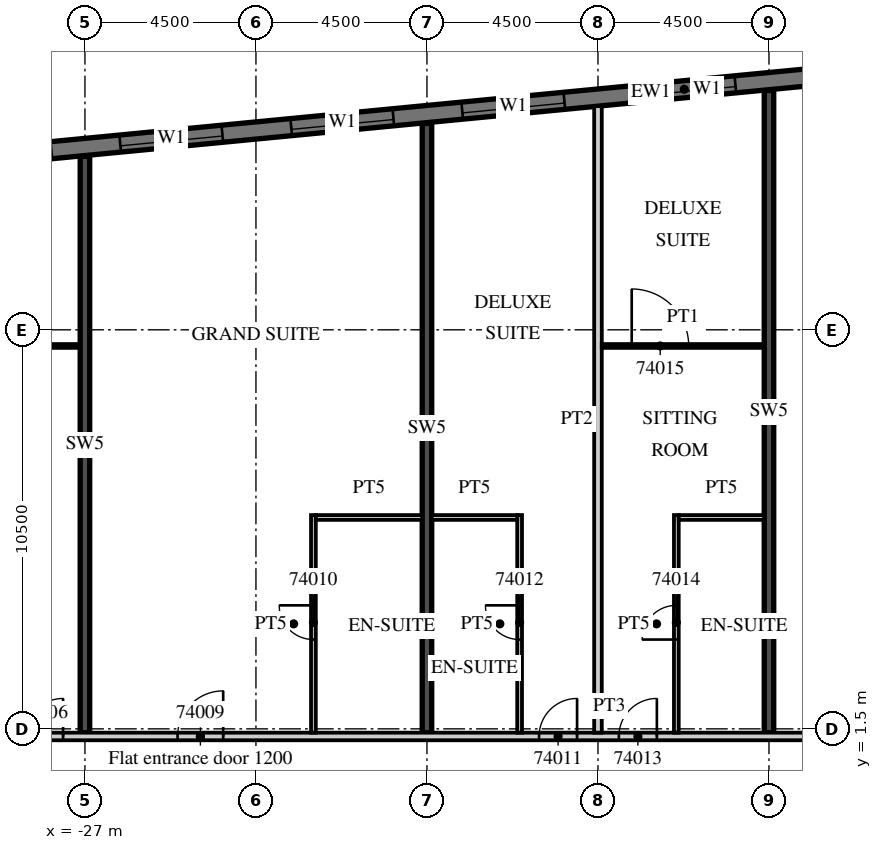
"""IFC4 building model, lengths in metres.
Left out: names, types, materials, properties, quantities, classifications, styles, units other than length and angle.
Written with IfcOpenShell. Run it as: python <this file> out.ifc"""

import sys

from ifc_helpers import new_model, si_unit, direction, frame, frame_2d, origin, place, context, subcontext, project, spatial, rectangle, extrude, element, fill, save


model = new_model("IFC4")
c1 = context("Model", 3, precision=1e-05, world=origin(), true_north=direction((0.0, 1.0)))
c2 = subcontext(c1, "Body", "Model", "MODEL_VIEW")
j1 = project(units=[si_unit("LENGTHUNIT", "METRE"), si_unit("PLANEANGLEUNIT", "RADIAN")], contexts=[c1])
p1 = place(None, origin())
s1 = spatial("IfcSite", under=j1, at=p1, CompositionType="ELEMENT")
p2 = place(p1, origin())
s2 = spatial("IfcBuilding", under=s1, at=p2, CompositionType="ELEMENT")
p3 = place(p2, frame((0.0, 0.0, 294.9)))
s3 = spatial("IfcBuildingStorey", under=s2, at=p3, CompositionType="ELEMENT", Elevation=294.9)
p4 = place(p3, frame((-27.0, 1.4, 0.0), z_axis=(0.0, 0.0, 1.0), x_axis=(0.0, 1.0, 0.0)))
e1 = element("IfcWall", 1, at=p4, inside=s3, PredefinedType="SHEAR", context=c2, shape_type="SweptSolid", body=[
    extrude(rectangle(XDim=15.163, YDim=0.25, at=frame_2d((7.582, 0.0))), origin(), (0.0, 0.0, 1.0), 3.3),
])
p5 = place(p3, frame((-18.0, 1.4, 0.0), z_axis=(0.0, 0.0, 1.0), x_axis=(0.0, 1.0, 0.0)))
e2 = element("IfcWall", 2, at=p5, inside=s3, PredefinedType="SHEAR", context=c2, shape_type="SweptSolid", body=[
    extrude(rectangle(XDim=16.03, YDim=0.25, at=frame_2d((8.015, 0.0))), origin(), (0.0, 0.0, 1.0), 3.3),
])
p6 = place(p3, frame((-9.0, 1.4, 0.0), z_axis=(0.0, 0.0, 1.0), x_axis=(0.0, 1.0, 0.0)))
e3 = element("IfcWall", 3, at=p6, inside=s3, PredefinedType="SHEAR", context=c2, shape_type="SweptSolid", body=[
    extrude(rectangle(XDim=16.896, YDim=0.25, at=frame_2d((8.448, 0.0))), origin(), (0.0, 0.0, 1.0), 3.3),
])
p7 = place(p3, frame((13.521, 20.713, 0.0), z_axis=(0.0, 0.0, 1.0), x_axis=(-0.995396277313, -0.095844932638, 0.0)))
e4 = element("IfcWall", 4, at=p7, inside=s3, PredefinedType="SOLIDWALL", context=c2, shape_type="SweptSolid", body=[
    extrude(rectangle(XDim=51.495, YDim=0.45, at=frame_2d((25.748, 0.0))), origin(), (0.0, 0.0, 1.0), 3.02),
])
p8 = place(p7, frame((0.91, 0.0, 0.45)))
e5 = element("IfcOpeningElement", 5, at=p8, cuts=e4, PredefinedType="OPENING", context=c2, shape_type="SweptSolid", body=[
    extrude(rectangle(XDim=2.7, YDim=2.25, at=frame_2d((1.35, 1.125))), frame((0.0, 0.235, 0.0), z_axis=(0.0, -1.0, 0.0), x_axis=(1.0, 0.0, 0.0)), (0.0, 0.0, 1.0), 0.47),
])
p9 = place(p7, frame((5.431, 0.0, 0.45)))
e6 = element("IfcOpeningElement", 6, at=p9, cuts=e4, PredefinedType="OPENING", context=c2, shape_type="SweptSolid", body=[
    extrude(rectangle(XDim=2.7, YDim=2.25, at=frame_2d((1.35, 1.125))), frame((0.0, 0.235, 0.0), z_axis=(0.0, -1.0, 0.0), x_axis=(1.0, 0.0, 0.0)), (0.0, 0.0, 1.0), 0.47),
])
p10 = place(p7, frame((9.952, 0.0, 0.45)))
e7 = element("IfcOpeningElement", 7, at=p10, cuts=e4, PredefinedType="OPENING", context=c2, shape_type="SweptSolid", body=[
    extrude(rectangle(XDim=2.7, YDim=2.25, at=frame_2d((1.35, 1.125))), frame((0.0, 0.235, 0.0), z_axis=(0.0, -1.0, 0.0), x_axis=(1.0, 0.0, 0.0)), (0.0, 0.0, 1.0), 0.47),
])
p11 = place(p7, frame((14.473, 0.0, 0.45)))
e8 = element("IfcOpeningElement", 8, at=p11, cuts=e4, PredefinedType="OPENING", context=c2, shape_type="SweptSolid", body=[
    extrude(rectangle(XDim=2.7, YDim=2.25, at=frame_2d((1.35, 1.125))), frame((0.0, 0.235, 0.0), z_axis=(0.0, -1.0, 0.0), x_axis=(1.0, 0.0, 0.0)), (0.0, 0.0, 1.0), 0.47),
])
p12 = place(p7, frame((18.994, 0.0, 0.45)))
e9 = element("IfcOpeningElement", 9, at=p12, cuts=e4, PredefinedType="OPENING", context=c2, shape_type="SweptSolid", body=[
    extrude(rectangle(XDim=2.7, YDim=2.25, at=frame_2d((1.35, 1.125))), frame((0.0, 0.235, 0.0), z_axis=(0.0, -1.0, 0.0), x_axis=(1.0, 0.0, 0.0)), (0.0, 0.0, 1.0), 0.47),
])
p13 = place(p7, frame((23.514, 0.0, 0.45)))
e10 = element("IfcOpeningElement", 10, at=p13, cuts=e4, PredefinedType="OPENING", context=c2, shape_type="SweptSolid", body=[
    extrude(rectangle(XDim=2.7, YDim=2.25, at=frame_2d((1.35, 1.125))), frame((0.0, 0.235, 0.0), z_axis=(0.0, -1.0, 0.0), x_axis=(1.0, 0.0, 0.0)), (0.0, 0.0, 1.0), 0.47),
])
p14 = place(p7, frame((28.035, 0.0, 0.45)))
e11 = element("IfcOpeningElement", 11, at=p14, cuts=e4, PredefinedType="OPENING", context=c2, shape_type="SweptSolid", body=[
    extrude(rectangle(XDim=2.7, YDim=2.25, at=frame_2d((1.35, 1.125))), frame((0.0, 0.235, 0.0), z_axis=(0.0, -1.0, 0.0), x_axis=(1.0, 0.0, 0.0)), (0.0, 0.0, 1.0), 0.47),
])
p15 = place(p7, frame((32.556, 0.0, 0.45)))
e12 = element("IfcOpeningElement", 12, at=p15, cuts=e4, PredefinedType="OPENING", context=c2, shape_type="SweptSolid", body=[
    extrude(rectangle(XDim=2.7, YDim=2.25, at=frame_2d((1.35, 1.125))), frame((0.0, 0.235, 0.0), z_axis=(0.0, -1.0, 0.0), x_axis=(1.0, 0.0, 0.0)), (0.0, 0.0, 1.0), 0.47),
])
p16 = place(p7, frame((37.077, 0.0, 0.45)))
e13 = element("IfcOpeningElement", 13, at=p16, cuts=e4, PredefinedType="OPENING", context=c2, shape_type="SweptSolid", body=[
    extrude(rectangle(XDim=2.7, YDim=2.25, at=frame_2d((1.35, 1.125))), frame((0.0, 0.235, 0.0), z_axis=(0.0, -1.0, 0.0), x_axis=(1.0, 0.0, 0.0)), (0.0, 0.0, 1.0), 0.47),
])
p17 = place(p7, frame((41.598, 0.0, 0.45)))
e14 = element("IfcOpeningElement", 14, at=p17, cuts=e4, PredefinedType="OPENING", context=c2, shape_type="SweptSolid", body=[
    extrude(rectangle(XDim=2.7, YDim=2.25, at=frame_2d((1.35, 1.125))), frame((0.0, 0.235, 0.0), z_axis=(0.0, -1.0, 0.0), x_axis=(1.0, 0.0, 0.0)), (0.0, 0.0, 1.0), 0.47),
])
p18 = place(p7, frame((46.118, 0.0, 0.45)))
e15 = element("IfcOpeningElement", 15, at=p18, cuts=e4, PredefinedType="OPENING", context=c2, shape_type="SweptSolid", body=[
    extrude(rectangle(XDim=2.7, YDim=2.25, at=frame_2d((1.35, 1.125))), frame((0.0, 0.235, 0.0), z_axis=(0.0, -1.0, 0.0), x_axis=(1.0, 0.0, 0.0)), (0.0, 0.0, 1.0), 0.47),
])
p19 = place(p3, frame((-39.909, 1.3, 0.0), z_axis=(0.0, 0.0, 1.0), x_axis=(1.0, 0.0, 0.0)))
e16 = element("IfcWall", 16, at=p19, inside=s3, PredefinedType="PARTITIONING", context=c2, shape_type="SweptSolid", body=[
    extrude(rectangle(XDim=53.409, YDim=0.2, at=frame_2d((26.705, 0.0))), origin(), (0.0, 0.0, 1.0), 3.02),
])
p20 = place(p19, frame((0.255, 0.0, 0.0)))
e17 = element("IfcOpeningElement", 17, at=p20, cuts=e16, PredefinedType="OPENING", context=c2, shape_type="SweptSolid", body=[
    extrude(rectangle(XDim=0.9, YDim=2.1, at=frame_2d((0.45, 1.05))), frame((0.0, 0.11, 0.0), z_axis=(0.0, -1.0, 0.0), x_axis=(1.0, 0.0, 0.0)), (0.0, 0.0, 1.0), 0.22),
])
p21 = place(p19, frame((4.484, 0.0, 0.0)))
e18 = element("IfcOpeningElement", 18, at=p21, cuts=e16, PredefinedType="OPENING", context=c2, shape_type="SweptSolid", body=[
    extrude(rectangle(XDim=1.0, YDim=2.1, at=frame_2d((0.5, 1.05))), frame((0.0, 0.11, 0.0), z_axis=(0.0, -1.0, 0.0), x_axis=(1.0, 0.0, 0.0)), (0.0, 0.0, 1.0), 0.22),
])
p22 = place(p19, frame((11.334, 0.0, 0.0)))
e19 = element("IfcOpeningElement", 19, at=p22, cuts=e16, PredefinedType="OPENING", context=c2, shape_type="SweptSolid", body=[
    extrude(rectangle(XDim=1.0, YDim=2.1, at=frame_2d((0.5, 1.05))), frame((0.0, 0.11, 0.0), z_axis=(0.0, -1.0, 0.0), x_axis=(1.0, 0.0, 0.0)), (0.0, 0.0, 1.0), 0.22),
])
p23 = place(p19, frame((15.347, 0.0, 0.0)))
e20 = element("IfcOpeningElement", 20, at=p23, cuts=e16, PredefinedType="OPENING", context=c2, shape_type="SweptSolid", body=[
    extrude(rectangle(XDim=1.2, YDim=2.1, at=frame_2d((0.6, 1.05))), frame((0.0, 0.11, 0.0), z_axis=(0.0, -1.0, 0.0), x_axis=(1.0, 0.0, 0.0)), (0.0, 0.0, 1.0), 0.22),
])
p24 = place(p19, frame((24.859, 0.0, 0.0)))
e21 = element("IfcOpeningElement", 21, at=p24, cuts=e16, PredefinedType="OPENING", context=c2, shape_type="SweptSolid", body=[
    extrude(rectangle(XDim=1.0, YDim=2.1, at=frame_2d((0.5, 1.05))), frame((0.0, 0.11, 0.0), z_axis=(0.0, -1.0, 0.0), x_axis=(1.0, 0.0, 0.0)), (0.0, 0.0, 1.0), 0.22),
])
p25 = place(p19, frame((26.959, 0.0, 0.0)))
e22 = element("IfcOpeningElement", 22, at=p25, cuts=e16, PredefinedType="OPENING", context=c2, shape_type="SweptSolid", body=[
    extrude(rectangle(XDim=1.0, YDim=2.1, at=frame_2d((0.5, 1.05))), frame((0.0, 0.11, 0.0), z_axis=(0.0, -1.0, 0.0), x_axis=(1.0, 0.0, 0.0)), (0.0, 0.0, 1.0), 0.22),
])
p26 = place(p19, frame((33.346, 0.0, 0.0)))
e23 = element("IfcOpeningElement", 23, at=p26, cuts=e16, PredefinedType="OPENING", context=c2, shape_type="SweptSolid", body=[
    extrude(rectangle(XDim=1.2, YDim=2.1, at=frame_2d((0.6, 1.05))), frame((0.0, 0.11, 0.0), z_axis=(0.0, -1.0, 0.0), x_axis=(1.0, 0.0, 0.0)), (0.0, 0.0, 1.0), 0.22),
])
p27 = place(p19, frame((42.859, 0.0, 0.0)))
e24 = element("IfcOpeningElement", 24, at=p27, cuts=e16, PredefinedType="OPENING", context=c2, shape_type="SweptSolid", body=[
    extrude(rectangle(XDim=1.0, YDim=2.1, at=frame_2d((0.5, 1.05))), frame((0.0, 0.11, 0.0), z_axis=(0.0, -1.0, 0.0), x_axis=(1.0, 0.0, 0.0)), (0.0, 0.0, 1.0), 0.22),
])
p28 = place(p19, frame((44.959, 0.0, 0.0)))
e25 = element("IfcOpeningElement", 25, at=p28, cuts=e16, PredefinedType="OPENING", context=c2, shape_type="SweptSolid", body=[
    extrude(rectangle(XDim=1.0, YDim=2.1, at=frame_2d((0.5, 1.05))), frame((0.0, 0.11, 0.0), z_axis=(0.0, -1.0, 0.0), x_axis=(1.0, 0.0, 0.0)), (0.0, 0.0, 1.0), 0.22),
])
p29 = place(p19, frame((49.484, 0.0, 0.0)))
e26 = element("IfcOpeningElement", 26, at=p29, cuts=e16, PredefinedType="OPENING", context=c2, shape_type="SweptSolid", body=[
    extrude(rectangle(XDim=1.0, YDim=2.1, at=frame_2d((0.5, 1.05))), frame((0.0, 0.11, 0.0), z_axis=(0.0, -1.0, 0.0), x_axis=(1.0, 0.0, 0.0)), (0.0, 0.0, 1.0), 0.22),
])
p30 = place(p3, frame((-31.4, 11.575, 0.0), z_axis=(0.0, 0.0, 1.0), x_axis=(1.0, 0.0, 0.0)))
e27 = element("IfcWall", 27, at=p30, inside=s3, PredefinedType="PARTITIONING", context=c2, shape_type="SweptSolid", body=[
    extrude(rectangle(XDim=4.275, YDim=0.1, at=frame_2d((2.137, 0.0))), origin(), (0.0, 0.0, 1.0), 3.02),
])
p31 = place(p30, frame((0.787, 0.0, 0.0)))
e28 = element("IfcOpeningElement", 28, at=p31, cuts=e27, PredefinedType="OPENING", context=c2, shape_type="SweptSolid", body=[
    extrude(rectangle(XDim=1.5, YDim=2.1, at=frame_2d((0.75, 1.05))), frame((0.0, 0.06, 0.0), z_axis=(0.0, -1.0, 0.0), x_axis=(1.0, 0.0, 0.0)), (0.0, 0.0, 1.0), 0.12),
])
p32 = place(p3, frame((-20.988, 1.4, 0.0), z_axis=(0.0, 0.0, 1.0), x_axis=(0.0, 1.0, 0.0)))
e29 = element("IfcWall", 29, at=p32, inside=s3, PredefinedType="PARTITIONING", context=c2, shape_type="SweptSolid", body=[
    extrude(rectangle(XDim=5.725, YDim=0.125, at=frame_2d((2.863, 0.0))), origin(), (0.0, 0.0, 1.0), 3.02),
])
p33 = place(p32, frame((2.45, 0.0, 0.0)))
e30 = element("IfcOpeningElement", 30, at=p33, cuts=e29, PredefinedType="OPENING", context=c2, shape_type="SweptSolid", body=[
    extrude(rectangle(XDim=0.9, YDim=2.1, at=frame_2d((0.45, 1.05))), frame((0.0, 0.073, 0.0), z_axis=(0.0, -1.0, 0.0), x_axis=(1.0, 0.0, 0.0)), (0.0, 0.0, 1.0), 0.145),
])
p34 = place(p3, frame((-20.925, 7.062, 0.0), z_axis=(0.0, 0.0, 1.0), x_axis=(1.0, 0.0, 0.0)))
e31 = element("IfcWall", 31, at=p34, inside=s3, PredefinedType="PARTITIONING", context=c2, shape_type="SweptSolid", body=[
    extrude(rectangle(XDim=2.8, YDim=0.125, at=frame_2d((1.4, 0.0))), origin(), (0.0, 0.0, 1.0), 3.02),
])
p35 = place(p3, frame((-13.5, 1.4, 0.0), z_axis=(0.0, 0.0, 1.0), x_axis=(0.0, 1.0, 0.0)))
e32 = element("IfcWall", 32, at=p35, inside=s3, PredefinedType="PARTITIONING", context=c2, shape_type="SweptSolid", body=[
    extrude(rectangle(XDim=16.485, YDim=0.2, at=frame_2d((8.243, 0.0))), origin(), (0.0, 0.0, 1.0), 3.02),
])
p36 = place(p3, frame((-15.562, 1.4, 0.0), z_axis=(0.0, 0.0, 1.0), x_axis=(0.0, 1.0, 0.0)))
e33 = element("IfcWall", 33, at=p36, inside=s3, PredefinedType="PARTITIONING", context=c2, shape_type="SweptSolid", body=[
    extrude(rectangle(XDim=5.725, YDim=0.125, at=frame_2d((2.863, 0.0))), origin(), (0.0, 0.0, 1.0), 3.02),
])
p37 = place(p36, frame((2.45, 0.0, 0.0)))
e34 = element("IfcOpeningElement", 34, at=p37, cuts=e33, PredefinedType="OPENING", context=c2, shape_type="SweptSolid", body=[
    extrude(rectangle(XDim=0.9, YDim=2.1, at=frame_2d((0.45, 1.05))), frame((0.0, 0.073, 0.0), z_axis=(0.0, -1.0, 0.0), x_axis=(1.0, 0.0, 0.0)), (0.0, 0.0, 1.0), 0.145),
])
p38 = place(p3, frame((-17.875, 7.062, 0.0), z_axis=(0.0, 0.0, 1.0), x_axis=(1.0, 0.0, 0.0)))
e35 = element("IfcWall", 35, at=p38, inside=s3, PredefinedType="PARTITIONING", context=c2, shape_type="SweptSolid", body=[
    extrude(rectangle(XDim=2.25, YDim=0.125, at=frame_2d((1.125, 0.0))), origin(), (0.0, 0.0, 1.0), 3.02),
])
p39 = place(p3, frame((-11.438, 1.4, 0.0), z_axis=(0.0, 0.0, 1.0), x_axis=(0.0, 1.0, 0.0)))
e36 = element("IfcWall", 36, at=p39, inside=s3, PredefinedType="PARTITIONING", context=c2, shape_type="SweptSolid", body=[
    extrude(rectangle(XDim=5.725, YDim=0.125, at=frame_2d((2.863, 0.0))), origin(), (0.0, 0.0, 1.0), 3.02),
])
p40 = place(p39, frame((2.45, 0.0, 0.0)))
e37 = element("IfcOpeningElement", 37, at=p40, cuts=e36, PredefinedType="OPENING", context=c2, shape_type="SweptSolid", body=[
    extrude(rectangle(XDim=0.9, YDim=2.1, at=frame_2d((0.45, 1.05))), frame((0.0, 0.073, 0.0), z_axis=(0.0, -1.0, 0.0), x_axis=(1.0, 0.0, 0.0)), (0.0, 0.0, 1.0), 0.145),
])
p41 = place(p3, frame((-11.375, 7.062, 0.0), z_axis=(0.0, 0.0, 1.0), x_axis=(1.0, 0.0, 0.0)))
e38 = element("IfcWall", 38, at=p41, inside=s3, PredefinedType="PARTITIONING", context=c2, shape_type="SweptSolid", body=[
    extrude(rectangle(XDim=2.25, YDim=0.125, at=frame_2d((1.125, 0.0))), origin(), (0.0, 0.0, 1.0), 3.02),
])
p42 = place(p3, frame((-13.4, 11.575, 0.0), z_axis=(0.0, 0.0, 1.0), x_axis=(1.0, 0.0, 0.0)))
e39 = element("IfcWall", 39, at=p42, inside=s3, PredefinedType="PARTITIONING", context=c2, shape_type="SweptSolid", body=[
    extrude(rectangle(XDim=4.275, YDim=0.1, at=frame_2d((2.137, 0.0))), origin(), (0.0, 0.0, 1.0), 3.02),
])
p43 = place(p42, frame((0.788, 0.0, 0.0)))
e40 = element("IfcOpeningElement", 40, at=p43, cuts=e39, PredefinedType="OPENING", context=c2, shape_type="SweptSolid", body=[
    extrude(rectangle(XDim=1.5, YDim=2.1, at=frame_2d((0.75, 1.05))), frame((0.0, 0.06, 0.0), z_axis=(0.0, -1.0, 0.0), x_axis=(1.0, 0.0, 0.0)), (0.0, 0.0, 1.0), 0.12),
])
p44 = place(p13, origin())
e41 = element("IfcWindow", 41, at=p44, inside=s3, PartitioningType="SINGLE_PANEL", PredefinedType="WINDOW", context=c2, shape_type="SweptSolid", body=[
    extrude(rectangle(XDim=2.7, YDim=2.25, at=frame_2d((1.35, 1.125))), frame((0.0, 0.09, 0.0), z_axis=(0.0, -1.0, 0.0), x_axis=(1.0, 0.0, 0.0)), (0.0, 0.0, 1.0), 0.06),
])
fill(e10, e41)
p45 = place(p14, origin())
e42 = element("IfcWindow", 42, at=p45, inside=s3, PartitioningType="SINGLE_PANEL", PredefinedType="WINDOW", context=c2, shape_type="SweptSolid", body=[
    extrude(rectangle(XDim=2.7, YDim=2.25, at=frame_2d((1.35, 1.125))), frame((0.0, 0.09, 0.0), z_axis=(0.0, -1.0, 0.0), x_axis=(1.0, 0.0, 0.0)), (0.0, 0.0, 1.0), 0.06),
])
fill(e11, e42)
p46 = place(p15, origin())
e43 = element("IfcWindow", 43, at=p46, inside=s3, PartitioningType="SINGLE_PANEL", PredefinedType="WINDOW", context=c2, shape_type="SweptSolid", body=[
    extrude(rectangle(XDim=2.7, YDim=2.25, at=frame_2d((1.35, 1.125))), frame((0.0, 0.09, 0.0), z_axis=(0.0, -1.0, 0.0), x_axis=(1.0, 0.0, 0.0)), (0.0, 0.0, 1.0), 0.06),
])
fill(e12, e43)
p47 = place(p16, origin())
e44 = element("IfcWindow", 44, at=p47, inside=s3, PartitioningType="SINGLE_PANEL", PredefinedType="WINDOW", context=c2, shape_type="SweptSolid", body=[
    extrude(rectangle(XDim=2.7, YDim=2.25, at=frame_2d((1.35, 1.125))), frame((0.0, 0.09, 0.0), z_axis=(0.0, -1.0, 0.0), x_axis=(1.0, 0.0, 0.0)), (0.0, 0.0, 1.0), 0.06),
])
fill(e13, e44)
p48 = place(p22, origin())
e45 = element("IfcDoor", 45, at=p48, inside=s3, OperationType="SINGLE_SWING_RIGHT", PredefinedType="DOOR", context=c2, shape_type="SweptSolid", body=[
    extrude(rectangle(XDim=1.0, YDim=2.1, at=frame_2d((0.5, 1.05))), frame((0.0, 0.025, 0.0), z_axis=(0.0, -1.0, 0.0), x_axis=(1.0, 0.0, 0.0)), (0.0, 0.0, 1.0), 0.05),
])
fill(e19, e45)
p49 = place(p23, origin())
e46 = element("IfcDoor", 46, at=p49, inside=s3, OperationType="SINGLE_SWING_RIGHT", PredefinedType="DOOR", context=c2, shape_type="SweptSolid", body=[
    extrude(rectangle(XDim=1.2, YDim=2.1, at=frame_2d((0.6, 1.05))), frame((0.0, 0.025, 0.0), z_axis=(0.0, -1.0, 0.0), x_axis=(1.0, 0.0, 0.0)), (0.0, 0.0, 1.0), 0.05),
])
fill(e20, e46)
p50 = place(p33, origin())
e47 = element("IfcDoor", 47, at=p50, inside=s3, OperationType="SINGLE_SWING_RIGHT", PredefinedType="DOOR", context=c2, shape_type="SweptSolid", body=[
    extrude(rectangle(XDim=0.9, YDim=2.1, at=frame_2d((0.45, 1.05))), frame((0.0, 0.025, 0.0), z_axis=(0.0, -1.0, 0.0), x_axis=(1.0, 0.0, 0.0)), (0.0, 0.0, 1.0), 0.05),
])
fill(e30, e47)
p51 = place(p24, origin())
e48 = element("IfcDoor", 48, at=p51, inside=s3, OperationType="SINGLE_SWING_RIGHT", PredefinedType="DOOR", context=c2, shape_type="SweptSolid", body=[
    extrude(rectangle(XDim=1.0, YDim=2.1, at=frame_2d((0.5, 1.05))), frame((0.0, 0.025, 0.0), z_axis=(0.0, -1.0, 0.0), x_axis=(1.0, 0.0, 0.0)), (0.0, 0.0, 1.0), 0.05),
])
fill(e21, e48)
p52 = place(p37, origin())
e49 = element("IfcDoor", 49, at=p52, inside=s3, OperationType="SINGLE_SWING_RIGHT", PredefinedType="DOOR", context=c2, shape_type="SweptSolid", body=[
    extrude(rectangle(XDim=0.9, YDim=2.1, at=frame_2d((0.45, 1.05))), frame((0.0, 0.025, 0.0), z_axis=(0.0, -1.0, 0.0), x_axis=(1.0, 0.0, 0.0)), (0.0, 0.0, 1.0), 0.05),
])
fill(e34, e49)
p53 = place(p25, origin())
e50 = element("IfcDoor", 50, at=p53, inside=s3, OperationType="SINGLE_SWING_RIGHT", PredefinedType="DOOR", context=c2, shape_type="SweptSolid", body=[
    extrude(rectangle(XDim=1.0, YDim=2.1, at=frame_2d((0.5, 1.05))), frame((0.0, 0.025, 0.0), z_axis=(0.0, -1.0, 0.0), x_axis=(1.0, 0.0, 0.0)), (0.0, 0.0, 1.0), 0.05),
])
fill(e22, e50)
p54 = place(p40, origin())
e51 = element("IfcDoor", 51, at=p54, inside=s3, OperationType="SINGLE_SWING_LEFT", PredefinedType="DOOR", context=c2, shape_type="SweptSolid", body=[
    extrude(rectangle(XDim=0.9, YDim=2.1, at=frame_2d((0.45, 1.05))), frame((0.0, 0.025, 0.0), z_axis=(0.0, -1.0, 0.0), x_axis=(1.0, 0.0, 0.0)), (0.0, 0.0, 1.0), 0.05),
])
fill(e37, e51)
p55 = place(p43, origin())
e52 = element("IfcDoor", 52, at=p55, inside=s3, OperationType="SINGLE_SWING_LEFT", PredefinedType="DOOR", context=c2, shape_type="SweptSolid", body=[
    extrude(rectangle(XDim=1.5, YDim=2.1, at=frame_2d((0.75, 1.05))), frame((0.0, 0.025, 0.0), z_axis=(0.0, -1.0, 0.0), x_axis=(1.0, 0.0, 0.0)), (0.0, 0.0, 1.0), 0.05),
])
fill(e40, e52)
save(model, sys.argv[1])
